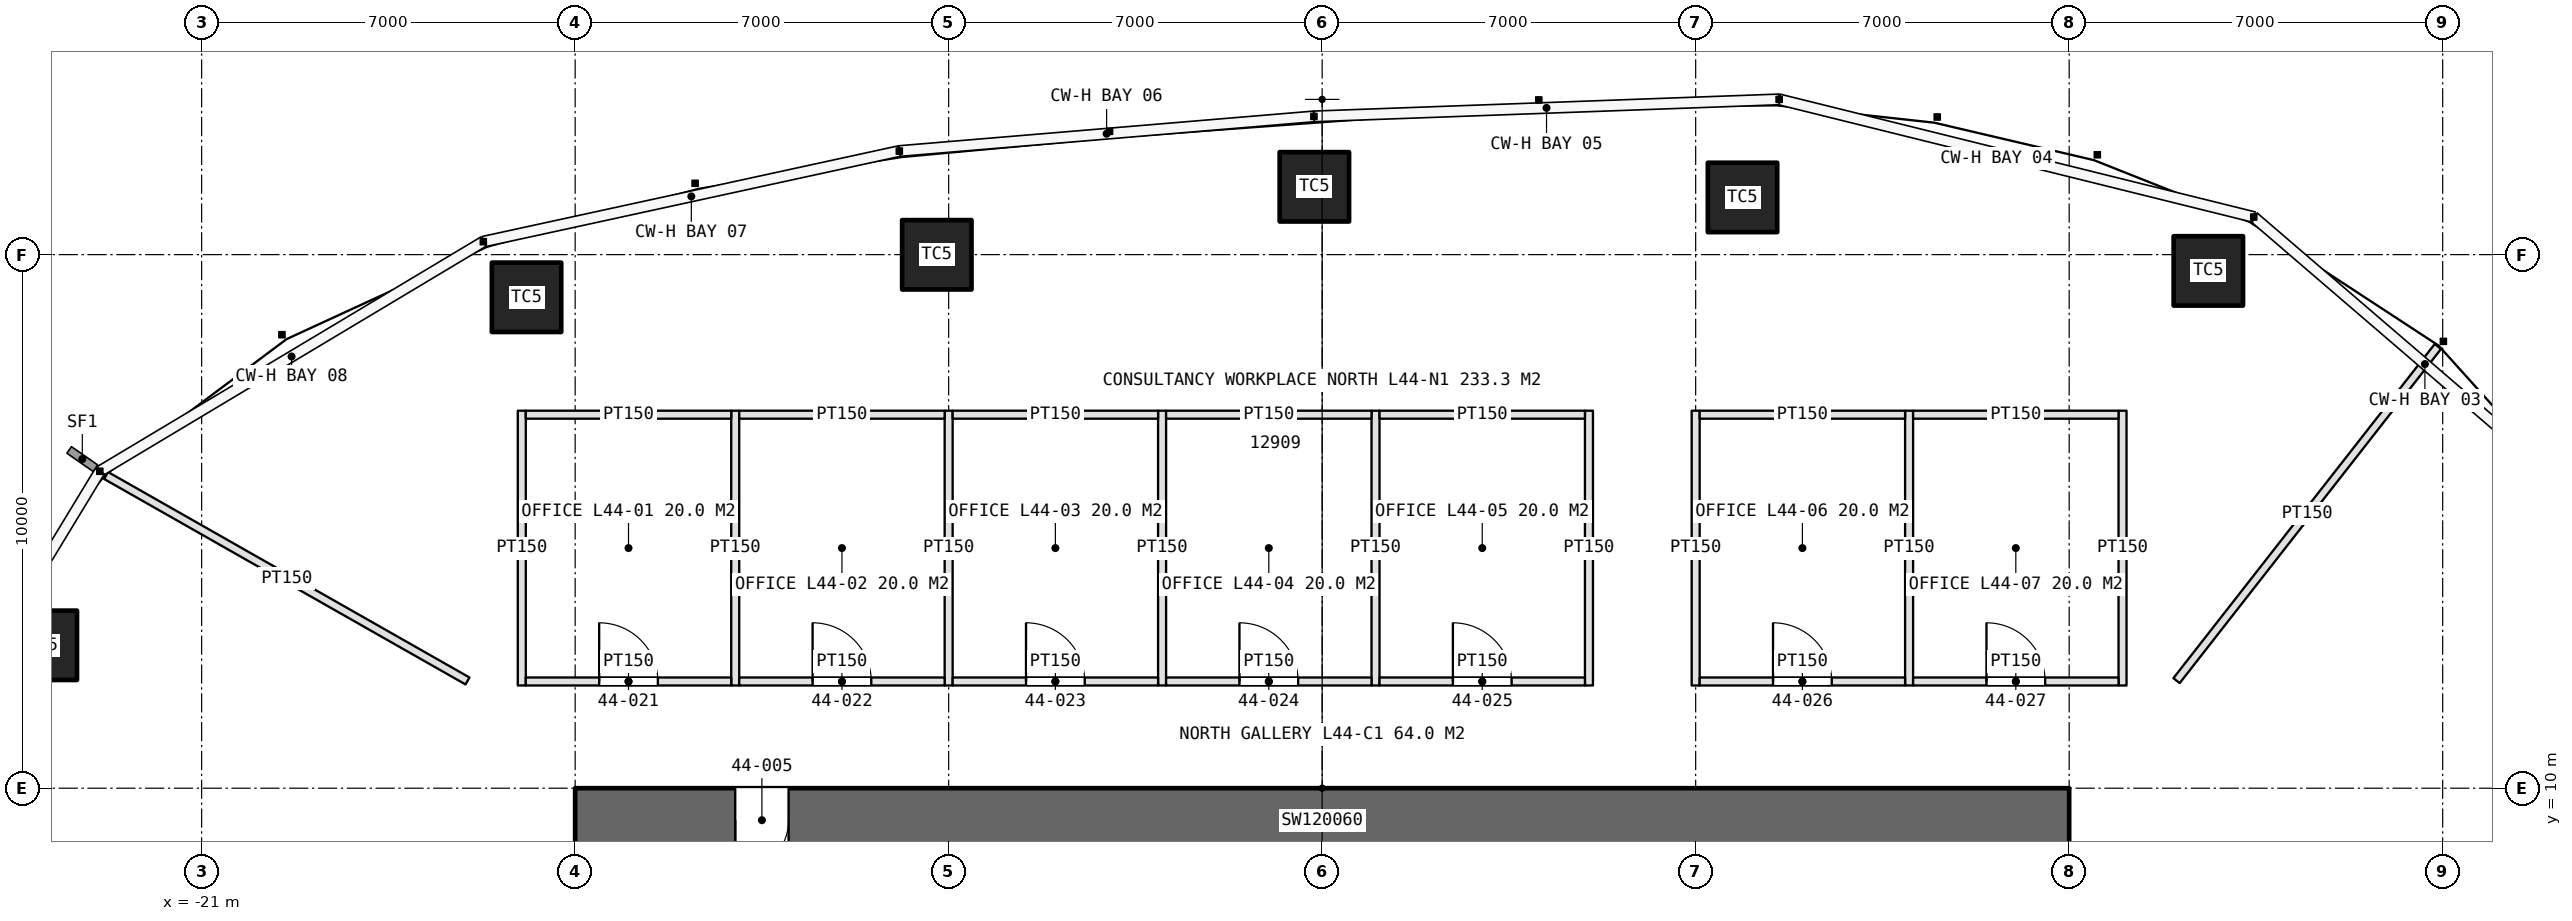
"""IFC4 building model, lengths in metres.
Left out: names, types, materials, properties, quantities, classifications, styles, units other than length and angle.
Written with IfcOpenShell. Run it as: python <this file> out.ifc"""

import sys

from ifc_helpers import new_model, si_unit, direction, frame, frame_2d, origin, origin_2d, place, context, subcontext, project, spatial, rectangle, extrude, element, fill, save


model = new_model("IFC4")
c1 = context("Model", 3, precision=1e-05, world=origin(), true_north=direction((0.0, 1.0)))
c2 = subcontext(c1, "Body", "Model", "MODEL_VIEW")
j1 = project(units=[si_unit("LENGTHUNIT", "METRE"), si_unit("PLANEANGLEUNIT", "RADIAN")], contexts=[c1])
p1 = place(None, origin())
s1 = spatial("IfcSite", under=j1, at=p1, CompositionType="ELEMENT")
p2 = place(p1, origin())
s2 = spatial("IfcBuilding", under=s1, at=p2, CompositionType="ELEMENT")
p3 = place(p2, frame((0.0, 0.0, 203.2)))
s3 = spatial("IfcBuildingStorey", under=s2, at=p3, CompositionType="ELEMENT", Elevation=203.2)
p4 = place(p3, frame((14.0, 9.4, 0.0), z_axis=(0.0, 0.0, 1.0), x_axis=(-1.0, 0.0, 0.0)))
e1 = element("IfcWall", 1, at=p4, inside=s3, PredefinedType="SHEAR", context=c2, shape_type="SweptSolid", body=[
    extrude(rectangle(XDim=28.0, YDim=1.2, at=frame_2d((14.0, 0.0))), origin(), (0.0, 0.0, 1.0), 4.2),
])
p5 = place(p4, frame((24.0, 0.0, 0.0)))
e2 = element("IfcOpeningElement", 2, at=p5, cuts=e1, PredefinedType="OPENING", context=c2, shape_type="SweptSolid", body=[
    extrude(rectangle(XDim=1.0, YDim=2.4, at=frame_2d((0.5, 1.2))), frame((0.0, 0.61, 0.0), z_axis=(0.0, -1.0, 0.0), x_axis=(1.0, 0.0, 0.0)), (0.0, 0.0, 1.0), 1.22),
])
for number, where, z_axis, x_axis in (
    (3, (16.608, 19.695, 0.0), (0.0, 0.0, 1.0), (1.0, 0.0, 0.0)),
    (4, (7.878, 21.072, 0.0), (0.0, 0.0, 1.0), (1.0, 0.0, 0.0)),
    (5, (-0.146, 21.271, 0.0), (0.0, 0.0, 1.0), (1.0, 0.0, 0.0)),
    (6, (-7.222, 19.997, 0.0), (0.0, 0.0, 1.0), (1.0, 0.0, 0.0)),
    (7, (-14.911, 19.2, 0.0), (0.0, 0.0, 1.0), (1.0, 0.0, 0.0)),
    (8, (-23.986, 12.678, 0.0), (0.0, 0.0, 1.0), (1.0, 0.0, 0.0)),
):
    element("IfcColumn", number, at=place(p3, frame(where, z_axis=z_axis, x_axis=x_axis)), inside=s3, PredefinedType="COLUMN", context=c2, shape_type="SweptSolid", body=[
        extrude(rectangle(XDim=1.3, YDim=1.3, at=origin_2d()), origin(), (0.0, 0.0, 1.0), 4.2),
    ])
for number, where, z_axis, x_axis in (
    (9, (-15.0, 11.925, 0.0), (0.0, 0.0, 1.0), (0.0, 1.0, 0.0)),
    (10, (-11.0, 11.925, 0.0), (0.0, 0.0, 1.0), (0.0, 1.0, 0.0)),
    (11, (-7.0, 11.925, 0.0), (0.0, 0.0, 1.0), (0.0, 1.0, 0.0)),
    (12, (-3.0, 11.925, 0.0), (0.0, 0.0, 1.0), (0.0, 1.0, 0.0)),
    (13, (1.0, 11.925, 0.0), (0.0, 0.0, 1.0), (0.0, 1.0, 0.0)),
    (14, (5.0, 11.925, 0.0), (0.0, 0.0, 1.0), (0.0, 1.0, 0.0)),
):
    element("IfcWall", number, at=place(p3, frame(where, z_axis=z_axis, x_axis=x_axis)), inside=s3, PredefinedType="PARTITIONING", context=c2, shape_type="SweptSolid", body=[
        extrude(rectangle(XDim=5.15, YDim=0.15, at=frame_2d((2.575, 0.0))), origin(), (0.0, 0.0, 1.0), 3.0),
    ])
p6 = place(p3, frame((-14.925, 12.0, 0.0), z_axis=(0.0, 0.0, 1.0), x_axis=(1.0, 0.0, 0.0)))
e15 = element("IfcWall", 15, at=p6, inside=s3, PredefinedType="PARTITIONING", context=c2, shape_type="SweptSolid", body=[
    extrude(rectangle(XDim=3.85, YDim=0.15, at=frame_2d((1.925, 0.0))), origin(), (0.0, 0.0, 1.0), 3.0),
])
p7 = place(p6, frame((1.375, 0.0, 0.0)))
e16 = element("IfcOpeningElement", 16, at=p7, cuts=e15, PredefinedType="OPENING", context=c2, shape_type="SweptSolid", body=[
    extrude(rectangle(XDim=1.1, YDim=2.3, at=frame_2d((0.55, 1.15))), frame((0.0, 0.085, 0.0), z_axis=(0.0, -1.0, 0.0), x_axis=(1.0, 0.0, 0.0)), (0.0, 0.0, 1.0), 0.17),
])
p8 = place(p3, frame((-14.925, 17.0, 0.0), z_axis=(0.0, 0.0, 1.0), x_axis=(1.0, 0.0, 0.0)))
e17 = element("IfcWall", 17, at=p8, inside=s3, PredefinedType="PARTITIONING", context=c2, shape_type="SweptSolid", body=[
    extrude(rectangle(XDim=3.85, YDim=0.15, at=frame_2d((1.925, 0.0))), origin(), (0.0, 0.0, 1.0), 3.0),
])
p9 = place(p3, frame((-10.925, 12.0, 0.0), z_axis=(0.0, 0.0, 1.0), x_axis=(1.0, 0.0, 0.0)))
e18 = element("IfcWall", 18, at=p9, inside=s3, PredefinedType="PARTITIONING", context=c2, shape_type="SweptSolid", body=[
    extrude(rectangle(XDim=3.85, YDim=0.15, at=frame_2d((1.925, 0.0))), origin(), (0.0, 0.0, 1.0), 3.0),
])
p10 = place(p9, frame((1.375, 0.0, 0.0)))
e19 = element("IfcOpeningElement", 19, at=p10, cuts=e18, PredefinedType="OPENING", context=c2, shape_type="SweptSolid", body=[
    extrude(rectangle(XDim=1.1, YDim=2.3, at=frame_2d((0.55, 1.15))), frame((0.0, 0.085, 0.0), z_axis=(0.0, -1.0, 0.0), x_axis=(1.0, 0.0, 0.0)), (0.0, 0.0, 1.0), 0.17),
])
p11 = place(p3, frame((-10.925, 17.0, 0.0), z_axis=(0.0, 0.0, 1.0), x_axis=(1.0, 0.0, 0.0)))
e20 = element("IfcWall", 20, at=p11, inside=s3, PredefinedType="PARTITIONING", context=c2, shape_type="SweptSolid", body=[
    extrude(rectangle(XDim=3.85, YDim=0.15, at=frame_2d((1.925, 0.0))), origin(), (0.0, 0.0, 1.0), 3.0),
])
p12 = place(p3, frame((-6.925, 12.0, 0.0), z_axis=(0.0, 0.0, 1.0), x_axis=(1.0, 0.0, 0.0)))
e21 = element("IfcWall", 21, at=p12, inside=s3, PredefinedType="PARTITIONING", context=c2, shape_type="SweptSolid", body=[
    extrude(rectangle(XDim=3.85, YDim=0.15, at=frame_2d((1.925, 0.0))), origin(), (0.0, 0.0, 1.0), 3.0),
])
p13 = place(p12, frame((1.375, 0.0, 0.0)))
e22 = element("IfcOpeningElement", 22, at=p13, cuts=e21, PredefinedType="OPENING", context=c2, shape_type="SweptSolid", body=[
    extrude(rectangle(XDim=1.1, YDim=2.3, at=frame_2d((0.55, 1.15))), frame((0.0, 0.085, 0.0), z_axis=(0.0, -1.0, 0.0), x_axis=(1.0, 0.0, 0.0)), (0.0, 0.0, 1.0), 0.17),
])
p14 = place(p3, frame((-6.925, 17.0, 0.0), z_axis=(0.0, 0.0, 1.0), x_axis=(1.0, 0.0, 0.0)))
e23 = element("IfcWall", 23, at=p14, inside=s3, PredefinedType="PARTITIONING", context=c2, shape_type="SweptSolid", body=[
    extrude(rectangle(XDim=3.85, YDim=0.15, at=frame_2d((1.925, 0.0))), origin(), (0.0, 0.0, 1.0), 3.0),
])
p15 = place(p3, frame((-2.925, 12.0, 0.0), z_axis=(0.0, 0.0, 1.0), x_axis=(1.0, 0.0, 0.0)))
e24 = element("IfcWall", 24, at=p15, inside=s3, PredefinedType="PARTITIONING", context=c2, shape_type="SweptSolid", body=[
    extrude(rectangle(XDim=3.85, YDim=0.15, at=frame_2d((1.925, 0.0))), origin(), (0.0, 0.0, 1.0), 3.0),
])
p16 = place(p15, frame((1.375, 0.0, 0.0)))
e25 = element("IfcOpeningElement", 25, at=p16, cuts=e24, PredefinedType="OPENING", context=c2, shape_type="SweptSolid", body=[
    extrude(rectangle(XDim=1.1, YDim=2.3, at=frame_2d((0.55, 1.15))), frame((0.0, 0.085, 0.0), z_axis=(0.0, -1.0, 0.0), x_axis=(1.0, 0.0, 0.0)), (0.0, 0.0, 1.0), 0.17),
])
p17 = place(p3, frame((-2.925, 17.0, 0.0), z_axis=(0.0, 0.0, 1.0), x_axis=(1.0, 0.0, 0.0)))
e26 = element("IfcWall", 26, at=p17, inside=s3, PredefinedType="PARTITIONING", context=c2, shape_type="SweptSolid", body=[
    extrude(rectangle(XDim=3.85, YDim=0.15, at=frame_2d((1.925, 0.0))), origin(), (0.0, 0.0, 1.0), 3.0),
])
p18 = place(p3, frame((1.075, 12.0, 0.0), z_axis=(0.0, 0.0, 1.0), x_axis=(1.0, 0.0, 0.0)))
e27 = element("IfcWall", 27, at=p18, inside=s3, PredefinedType="PARTITIONING", context=c2, shape_type="SweptSolid", body=[
    extrude(rectangle(XDim=3.85, YDim=0.15, at=frame_2d((1.925, 0.0))), origin(), (0.0, 0.0, 1.0), 3.0),
])
p19 = place(p18, frame((1.375, 0.0, 0.0)))
e28 = element("IfcOpeningElement", 28, at=p19, cuts=e27, PredefinedType="OPENING", context=c2, shape_type="SweptSolid", body=[
    extrude(rectangle(XDim=1.1, YDim=2.3, at=frame_2d((0.55, 1.15))), frame((0.0, 0.085, 0.0), z_axis=(0.0, -1.0, 0.0), x_axis=(1.0, 0.0, 0.0)), (0.0, 0.0, 1.0), 0.17),
])
p20 = place(p3, frame((1.075, 17.0, 0.0), z_axis=(0.0, 0.0, 1.0), x_axis=(1.0, 0.0, 0.0)))
e29 = element("IfcWall", 29, at=p20, inside=s3, PredefinedType="PARTITIONING", context=c2, shape_type="SweptSolid", body=[
    extrude(rectangle(XDim=3.85, YDim=0.15, at=frame_2d((1.925, 0.0))), origin(), (0.0, 0.0, 1.0), 3.0),
])
for number, where, z_axis, x_axis in (
    (30, (7.0, 11.925, 0.0), (0.0, 0.0, 1.0), (0.0, 1.0, 0.0)),
    (31, (11.0, 11.925, 0.0), (0.0, 0.0, 1.0), (0.0, 1.0, 0.0)),
    (32, (15.0, 11.925, 0.0), (0.0, 0.0, 1.0), (0.0, 1.0, 0.0)),
):
    element("IfcWall", number, at=place(p3, frame(where, z_axis=z_axis, x_axis=x_axis)), inside=s3, PredefinedType="PARTITIONING", context=c2, shape_type="SweptSolid", body=[
        extrude(rectangle(XDim=5.15, YDim=0.15, at=frame_2d((2.575, 0.0))), origin(), (0.0, 0.0, 1.0), 3.0),
    ])
p21 = place(p3, frame((7.075, 12.0, 0.0), z_axis=(0.0, 0.0, 1.0), x_axis=(1.0, 0.0, 0.0)))
e33 = element("IfcWall", 33, at=p21, inside=s3, PredefinedType="PARTITIONING", context=c2, shape_type="SweptSolid", body=[
    extrude(rectangle(XDim=3.85, YDim=0.15, at=frame_2d((1.925, 0.0))), origin(), (0.0, 0.0, 1.0), 3.0),
])
p22 = place(p21, frame((1.375, 0.0, 0.0)))
e34 = element("IfcOpeningElement", 34, at=p22, cuts=e33, PredefinedType="OPENING", context=c2, shape_type="SweptSolid", body=[
    extrude(rectangle(XDim=1.1, YDim=2.3, at=frame_2d((0.55, 1.15))), frame((0.0, 0.085, 0.0), z_axis=(0.0, -1.0, 0.0), x_axis=(1.0, 0.0, 0.0)), (0.0, 0.0, 1.0), 0.17),
])
p23 = place(p3, frame((7.075, 17.0, 0.0), z_axis=(0.0, 0.0, 1.0), x_axis=(1.0, 0.0, 0.0)))
e35 = element("IfcWall", 35, at=p23, inside=s3, PredefinedType="PARTITIONING", context=c2, shape_type="SweptSolid", body=[
    extrude(rectangle(XDim=3.85, YDim=0.15, at=frame_2d((1.925, 0.0))), origin(), (0.0, 0.0, 1.0), 3.0),
])
p24 = place(p3, frame((11.075, 12.0, 0.0), z_axis=(0.0, 0.0, 1.0), x_axis=(1.0, 0.0, 0.0)))
e36 = element("IfcWall", 36, at=p24, inside=s3, PredefinedType="PARTITIONING", context=c2, shape_type="SweptSolid", body=[
    extrude(rectangle(XDim=3.85, YDim=0.15, at=frame_2d((1.925, 0.0))), origin(), (0.0, 0.0, 1.0), 3.0),
])
p25 = place(p24, frame((1.375, 0.0, 0.0)))
e37 = element("IfcOpeningElement", 37, at=p25, cuts=e36, PredefinedType="OPENING", context=c2, shape_type="SweptSolid", body=[
    extrude(rectangle(XDim=1.1, YDim=2.3, at=frame_2d((0.55, 1.15))), frame((0.0, 0.085, 0.0), z_axis=(0.0, -1.0, 0.0), x_axis=(1.0, 0.0, 0.0)), (0.0, 0.0, 1.0), 0.17),
])
p26 = place(p3, frame((11.075, 17.0, 0.0), z_axis=(0.0, 0.0, 1.0), x_axis=(1.0, 0.0, 0.0)))
e38 = element("IfcWall", 38, at=p26, inside=s3, PredefinedType="PARTITIONING", context=c2, shape_type="SweptSolid", body=[
    extrude(rectangle(XDim=3.85, YDim=0.15, at=frame_2d((1.925, 0.0))), origin(), (0.0, 0.0, 1.0), 3.0),
])
p27 = place(p3, frame((-16.017, 12.01, 0.0), z_axis=(0.0, 0.0, 1.0), x_axis=(-0.869357432803, 0.494183826151, 0.0)))
e39 = element("IfcWall", 39, at=p27, inside=s3, PredefinedType="PARTITIONING", context=c2, shape_type="SweptSolid", body=[
    extrude(rectangle(XDim=7.791, YDim=0.15, at=frame_2d((3.896, 0.0))), origin(), (0.0, 0.0, 1.0), 3.0),
])
p28 = place(p3, frame((16.012, 12.016, 0.0), z_axis=(0.0, 0.0, 1.0), x_axis=(0.616030058222, 0.787722646219, 0.0)))
e40 = element("IfcWall", 40, at=p28, inside=s3, PredefinedType="PARTITIONING", context=c2, shape_type="SweptSolid", body=[
    extrude(rectangle(XDim=7.952, YDim=0.15, at=frame_2d((3.976, 0.0))), origin(), (0.0, 0.0, 1.0), 3.0),
])
p29 = place(p5, origin())
e41 = element("IfcDoor", 41, at=p29, inside=s3, OperationType="SINGLE_SWING_RIGHT", PredefinedType="DOOR", context=c2, shape_type="SweptSolid", body=[
    extrude(rectangle(XDim=1.0, YDim=2.4, at=frame_2d((0.5, 1.2))), frame((0.0, 0.025, 0.0), z_axis=(0.0, -1.0, 0.0), x_axis=(1.0, 0.0, 0.0)), (0.0, 0.0, 1.0), 0.05),
])
fill(e2, e41)
p30 = place(p7, origin())
e42 = element("IfcDoor", 42, at=p30, inside=s3, OperationType="SINGLE_SWING_LEFT", PredefinedType="DOOR", context=c2, shape_type="SweptSolid", body=[
    extrude(rectangle(XDim=1.1, YDim=2.3, at=frame_2d((0.55, 1.15))), frame((0.0, 0.025, 0.0), z_axis=(0.0, -1.0, 0.0), x_axis=(1.0, 0.0, 0.0)), (0.0, 0.0, 1.0), 0.05),
])
fill(e16, e42)
p31 = place(p10, origin())
e43 = element("IfcDoor", 43, at=p31, inside=s3, OperationType="SINGLE_SWING_LEFT", PredefinedType="DOOR", context=c2, shape_type="SweptSolid", body=[
    extrude(rectangle(XDim=1.1, YDim=2.3, at=frame_2d((0.55, 1.15))), frame((0.0, 0.025, 0.0), z_axis=(0.0, -1.0, 0.0), x_axis=(1.0, 0.0, 0.0)), (0.0, 0.0, 1.0), 0.05),
])
fill(e19, e43)
p32 = place(p13, origin())
e44 = element("IfcDoor", 44, at=p32, inside=s3, OperationType="SINGLE_SWING_LEFT", PredefinedType="DOOR", context=c2, shape_type="SweptSolid", body=[
    extrude(rectangle(XDim=1.1, YDim=2.3, at=frame_2d((0.55, 1.15))), frame((0.0, 0.025, 0.0), z_axis=(0.0, -1.0, 0.0), x_axis=(1.0, 0.0, 0.0)), (0.0, 0.0, 1.0), 0.05),
])
fill(e22, e44)
p33 = place(p16, origin())
e45 = element("IfcDoor", 45, at=p33, inside=s3, OperationType="SINGLE_SWING_LEFT", PredefinedType="DOOR", context=c2, shape_type="SweptSolid", body=[
    extrude(rectangle(XDim=1.1, YDim=2.3, at=frame_2d((0.55, 1.15))), frame((0.0, 0.025, 0.0), z_axis=(0.0, -1.0, 0.0), x_axis=(1.0, 0.0, 0.0)), (0.0, 0.0, 1.0), 0.05),
])
fill(e25, e45)
p34 = place(p19, origin())
e46 = element("IfcDoor", 46, at=p34, inside=s3, OperationType="SINGLE_SWING_LEFT", PredefinedType="DOOR", context=c2, shape_type="SweptSolid", body=[
    extrude(rectangle(XDim=1.1, YDim=2.3, at=frame_2d((0.55, 1.15))), frame((0.0, 0.025, 0.0), z_axis=(0.0, -1.0, 0.0), x_axis=(1.0, 0.0, 0.0)), (0.0, 0.0, 1.0), 0.05),
])
fill(e28, e46)
p35 = place(p22, origin())
e47 = element("IfcDoor", 47, at=p35, inside=s3, OperationType="SINGLE_SWING_LEFT", PredefinedType="DOOR", context=c2, shape_type="SweptSolid", body=[
    extrude(rectangle(XDim=1.1, YDim=2.3, at=frame_2d((0.55, 1.15))), frame((0.0, 0.025, 0.0), z_axis=(0.0, -1.0, 0.0), x_axis=(1.0, 0.0, 0.0)), (0.0, 0.0, 1.0), 0.05),
])
fill(e34, e47)
p36 = place(p25, origin())
e48 = element("IfcDoor", 48, at=p36, inside=s3, OperationType="SINGLE_SWING_LEFT", PredefinedType="DOOR", context=c2, shape_type="SweptSolid", body=[
    extrude(rectangle(XDim=1.1, YDim=2.3, at=frame_2d((0.55, 1.15))), frame((0.0, 0.025, 0.0), z_axis=(0.0, -1.0, 0.0), x_axis=(1.0, 0.0, 0.0)), (0.0, 0.0, 1.0), 0.05),
])
fill(e37, e48)
save(model, sys.argv[1])
